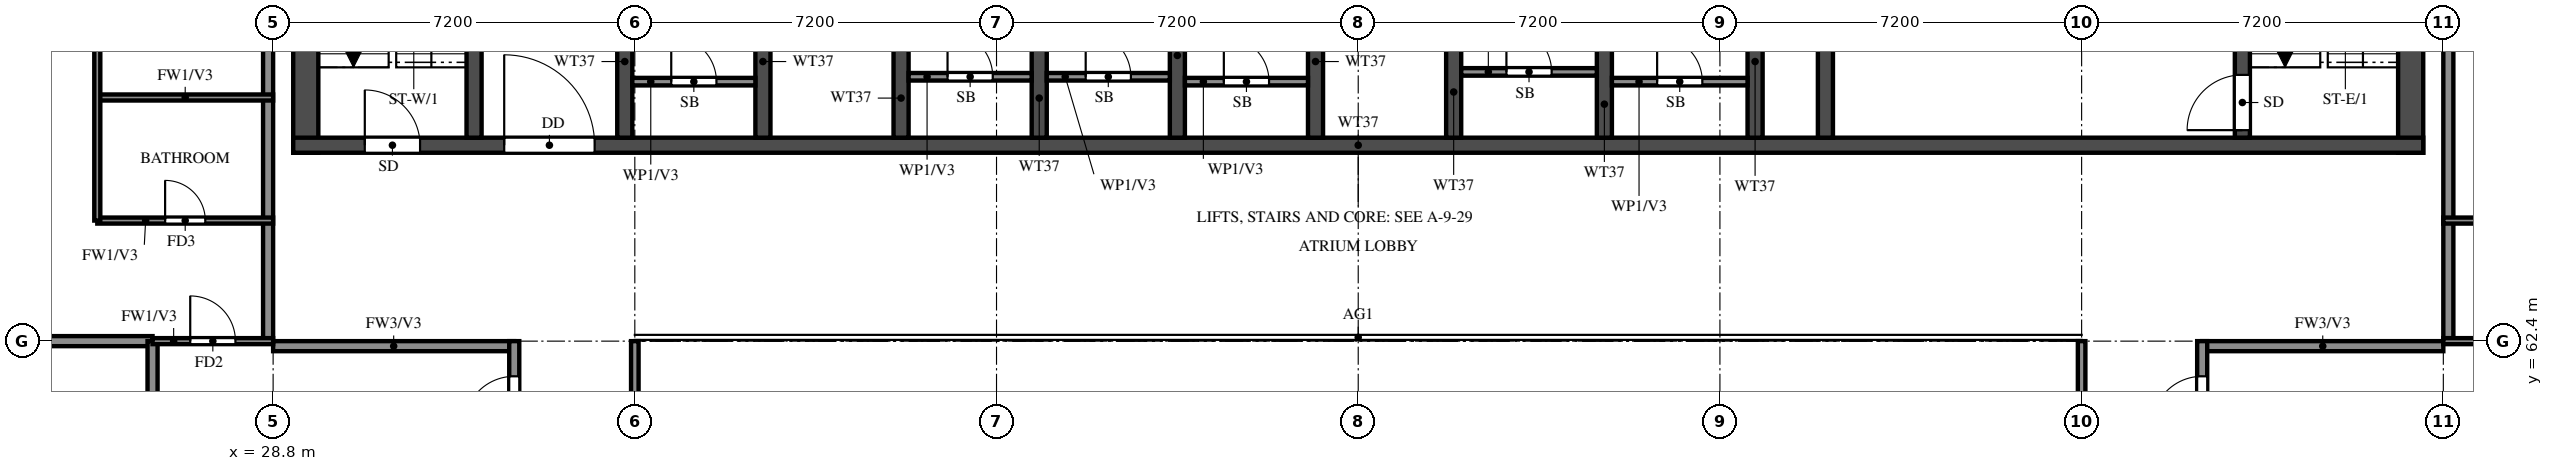
"""IFC4 building model, lengths in metres.
Left out: names, types, materials, properties, quantities, classifications, styles, units other than length and angle.
Written with IfcOpenShell. Run it as: python <this file> out.ifc"""

import sys

from ifc_helpers import new_model, si_unit, direction, frame, frame_2d, origin, place, context, subcontext, project, spatial, rectangle, extrude, element, fill, save


model = new_model("IFC4")
c1 = context("Model", 3, precision=1e-05, world=origin(), true_north=direction((0.0, 1.0)))
c2 = subcontext(c1, "Body", "Model", "MODEL_VIEW")
j1 = project(units=[si_unit("LENGTHUNIT", "METRE"), si_unit("PLANEANGLEUNIT", "RADIAN")], contexts=[c1])
p1 = place(None, origin())
s1 = spatial("IfcSite", under=j1, at=p1, CompositionType="ELEMENT")
p2 = place(p1, origin())
s2 = spatial("IfcBuilding", under=s1, at=p2, CompositionType="ELEMENT")
p3 = place(p2, frame((0.0, 0.0, 229.0)))
s3 = spatial("IfcBuildingStorey", under=s2, at=p3, CompositionType="ELEMENT", Elevation=229.0)
for number, where, z_axis, x_axis in (
    (1, (29.45, 66.15, 0.0), (0.0, 0.0, 1.0), (0.0, 1.0, 0.0)),
    (2, (71.35, 66.15, 0.0), (0.0, 0.0, 1.0), (0.0, 1.0, 0.0)),
):
    element("IfcWall", number, at=place(p3, frame(where, z_axis=z_axis, x_axis=x_axis)), inside=s3, PredefinedType="SHEAR", context=c2, shape_type="SweptSolid", body=[
        extrude(rectangle(XDim=11.85, YDim=0.5, at=frame_2d((5.925, 0.0))), origin(), (0.0, 0.0, 1.0), 3.22),
    ])
p4 = place(p3, frame((29.2, 66.3, 0.0), z_axis=(0.0, 0.0, 1.0), x_axis=(1.0, 0.0, 0.0)))
e3 = element("IfcWall", 3, at=p4, inside=s3, PredefinedType="SHEAR", context=c2, shape_type="SweptSolid", body=[
    extrude(rectangle(XDim=42.4, YDim=0.3, at=frame_2d((21.2, 0.0))), origin(), (0.0, 0.0, 1.0), 3.22),
])
p5 = place(p4, frame((1.425, 0.0, 0.0)))
e4 = element("IfcOpeningElement", 4, at=p5, cuts=e3, PredefinedType="OPENING", context=c2, shape_type="SweptSolid", body=[
    extrude(rectangle(XDim=1.1, YDim=2.1, at=frame_2d((0.55, 1.05))), frame((0.0, 0.16, 0.0), z_axis=(0.0, -1.0, 0.0), x_axis=(1.0, 0.0, 0.0)), (0.0, 0.0, 1.0), 0.32),
])
p6 = place(p4, frame((4.2, 0.0, 0.0)))
e5 = element("IfcOpeningElement", 5, at=p6, cuts=e3, PredefinedType="OPENING", context=c2, shape_type="SweptSolid", body=[
    extrude(rectangle(XDim=1.8, YDim=2.1, at=frame_2d((0.9, 1.05))), frame((0.0, 0.16, 0.0), z_axis=(0.0, -1.0, 0.0), x_axis=(1.0, 0.0, 0.0)), (0.0, 0.0, 1.0), 0.32),
])
p7 = place(p3, frame((32.8, 66.45, 0.0), z_axis=(0.0, 0.0, 1.0), x_axis=(0.0, 1.0, 0.0)))
e6 = element("IfcWall", 6, at=p7, inside=s3, PredefinedType="SHEAR", context=c2, shape_type="SweptSolid", body=[
    extrude(rectangle(XDim=11.05, YDim=0.3, at=frame_2d((5.525, 0.0))), origin(), (0.0, 0.0, 1.0), 3.22),
])
p8 = place(p3, frame((68.0, 66.45, 0.0), z_axis=(0.0, 0.0, 1.0), x_axis=(0.0, 1.0, 0.0)))
e7 = element("IfcWall", 7, at=p8, inside=s3, PredefinedType="SHEAR", context=c2, shape_type="SweptSolid", body=[
    extrude(rectangle(XDim=11.05, YDim=0.3, at=frame_2d((5.525, 0.0))), origin(), (0.0, 0.0, 1.0), 3.22),
])
p9 = place(p8, frame((0.15, 0.0, 0.0)))
e8 = element("IfcOpeningElement", 8, at=p9, cuts=e7, PredefinedType="OPENING", context=c2, shape_type="SweptSolid", body=[
    extrude(rectangle(XDim=1.1, YDim=2.1, at=frame_2d((0.55, 1.05))), frame((0.0, 0.16, 0.0), z_axis=(0.0, -1.0, 0.0), x_axis=(1.0, 0.0, 0.0)), (0.0, 0.0, 1.0), 0.32),
])
p10 = place(p3, frame((59.7, 66.45, 0.0), z_axis=(0.0, 0.0, 1.0), x_axis=(0.0, 1.0, 0.0)))
e9 = element("IfcWall", 9, at=p10, inside=s3, PredefinedType="SHEAR", context=c2, shape_type="SweptSolid", body=[
    extrude(rectangle(XDim=6.175, YDim=0.3, at=frame_2d((3.087, 0.0))), origin(), (0.0, 0.0, 1.0), 3.22),
])
p11 = place(p10, frame((3.85, 0.0, 0.0)))
e10 = element("IfcOpeningElement", 10, at=p11, cuts=e9, PredefinedType="OPENING", context=c2, shape_type="SweptSolid", body=[
    extrude(rectangle(XDim=1.2, YDim=2.1, at=frame_2d((0.6, 1.05))), frame((0.0, 0.16, 0.0), z_axis=(0.0, -1.0, 0.0), x_axis=(1.0, 0.0, 0.0)), (0.0, 0.0, 1.0), 0.32),
])
for number, where, z_axis, x_axis in (
    (11, (35.8, 66.45, 0.0), (0.0, 0.0, 1.0), (0.0, 1.0, 0.0)),
    (12, (38.55, 66.45, 0.0), (0.0, 0.0, 1.0), (0.0, 1.0, 0.0)),
    (13, (41.3, 66.45, 0.0), (0.0, 0.0, 1.0), (0.0, 1.0, 0.0)),
    (14, (44.05, 66.45, 0.0), (0.0, 0.0, 1.0), (0.0, 1.0, 0.0)),
    (15, (46.8, 66.45, 0.0), (0.0, 0.0, 1.0), (0.0, 1.0, 0.0)),
    (16, (49.55, 66.45, 0.0), (0.0, 0.0, 1.0), (0.0, 1.0, 0.0)),
    (17, (52.3, 66.45, 0.0), (0.0, 0.0, 1.0), (0.0, 1.0, 0.0)),
    (18, (55.3, 66.45, 0.0), (0.0, 0.0, 1.0), (0.0, 1.0, 0.0)),
    (19, (58.3, 66.45, 0.0), (0.0, 0.0, 1.0), (0.0, 1.0, 0.0)),
):
    element("IfcWall", number, at=place(p3, frame(where, z_axis=z_axis, x_axis=x_axis)), inside=s3, PredefinedType="SHEAR", context=c2, shape_type="SweptSolid", body=[
        extrude(rectangle(XDim=2.425, YDim=0.3, at=frame_2d((1.212, 0.0))), origin(), (0.0, 0.0, 1.0), 3.22),
    ])
p12 = place(p3, frame((35.95, 67.565, 0.0), z_axis=(0.0, 0.0, 1.0), x_axis=(1.0, 0.0, 0.0)))
e20 = element("IfcWall", 20, at=p12, inside=s3, PredefinedType="PARTITIONING", context=c2, shape_type="SweptSolid", body=[
    extrude(rectangle(XDim=2.45, YDim=0.15, at=frame_2d((1.225, 0.0))), origin(), (0.0, 0.0, 1.0), 3.22),
])
p13 = place(p12, frame((0.775, 0.0, 0.0)))
e21 = element("IfcOpeningElement", 21, at=p13, cuts=e20, PredefinedType="OPENING", context=c2, shape_type="SweptSolid", body=[
    extrude(rectangle(XDim=0.9, YDim=2.1, at=frame_2d((0.45, 1.05))), frame((0.0, 0.085, 0.0), z_axis=(0.0, -1.0, 0.0), x_axis=(1.0, 0.0, 0.0)), (0.0, 0.0, 1.0), 0.17),
])
p14 = place(p3, frame((41.45, 67.663, 0.0), z_axis=(0.0, 0.0, 1.0), x_axis=(1.0, 0.0, 0.0)))
e22 = element("IfcWall", 22, at=p14, inside=s3, PredefinedType="PARTITIONING", context=c2, shape_type="SweptSolid", body=[
    extrude(rectangle(XDim=2.45, YDim=0.15, at=frame_2d((1.225, 0.0))), origin(), (0.0, 0.0, 1.0), 3.22),
])
p15 = place(p14, frame((0.775, 0.0, 0.0)))
e23 = element("IfcOpeningElement", 23, at=p15, cuts=e22, PredefinedType="OPENING", context=c2, shape_type="SweptSolid", body=[
    extrude(rectangle(XDim=0.9, YDim=2.1, at=frame_2d((0.45, 1.05))), frame((0.0, 0.085, 0.0), z_axis=(0.0, -1.0, 0.0), x_axis=(1.0, 0.0, 0.0)), (0.0, 0.0, 1.0), 0.17),
])
p16 = place(p3, frame((44.2, 67.663, 0.0), z_axis=(0.0, 0.0, 1.0), x_axis=(1.0, 0.0, 0.0)))
e24 = element("IfcWall", 24, at=p16, inside=s3, PredefinedType="PARTITIONING", context=c2, shape_type="SweptSolid", body=[
    extrude(rectangle(XDim=2.45, YDim=0.15, at=frame_2d((1.225, 0.0))), origin(), (0.0, 0.0, 1.0), 3.22),
])
p17 = place(p16, frame((0.775, 0.0, 0.0)))
e25 = element("IfcOpeningElement", 25, at=p17, cuts=e24, PredefinedType="OPENING", context=c2, shape_type="SweptSolid", body=[
    extrude(rectangle(XDim=0.9, YDim=2.1, at=frame_2d((0.45, 1.05))), frame((0.0, 0.085, 0.0), z_axis=(0.0, -1.0, 0.0), x_axis=(1.0, 0.0, 0.0)), (0.0, 0.0, 1.0), 0.17),
])
p18 = place(p3, frame((46.95, 67.565, 0.0), z_axis=(0.0, 0.0, 1.0), x_axis=(1.0, 0.0, 0.0)))
e26 = element("IfcWall", 26, at=p18, inside=s3, PredefinedType="PARTITIONING", context=c2, shape_type="SweptSolid", body=[
    extrude(rectangle(XDim=2.45, YDim=0.15, at=frame_2d((1.225, 0.0))), origin(), (0.0, 0.0, 1.0), 3.22),
])
p19 = place(p18, frame((0.775, 0.0, 0.0)))
e27 = element("IfcOpeningElement", 27, at=p19, cuts=e26, PredefinedType="OPENING", context=c2, shape_type="SweptSolid", body=[
    extrude(rectangle(XDim=0.9, YDim=2.1, at=frame_2d((0.45, 1.05))), frame((0.0, 0.085, 0.0), z_axis=(0.0, -1.0, 0.0), x_axis=(1.0, 0.0, 0.0)), (0.0, 0.0, 1.0), 0.17),
])
p20 = place(p3, frame((52.45, 67.76, 0.0), z_axis=(0.0, 0.0, 1.0), x_axis=(1.0, 0.0, 0.0)))
e28 = element("IfcWall", 28, at=p20, inside=s3, PredefinedType="PARTITIONING", context=c2, shape_type="SweptSolid", body=[
    extrude(rectangle(XDim=2.7, YDim=0.15, at=frame_2d((1.35, 0.0))), origin(), (0.0, 0.0, 1.0), 3.22),
])
p21 = place(p20, frame((0.9, 0.0, 0.0)))
e29 = element("IfcOpeningElement", 29, at=p21, cuts=e28, PredefinedType="OPENING", context=c2, shape_type="SweptSolid", body=[
    extrude(rectangle(XDim=0.9, YDim=2.1, at=frame_2d((0.45, 1.05))), frame((0.0, 0.085, 0.0), z_axis=(0.0, -1.0, 0.0), x_axis=(1.0, 0.0, 0.0)), (0.0, 0.0, 1.0), 0.17),
])
p22 = place(p3, frame((55.45, 67.565, 0.0), z_axis=(0.0, 0.0, 1.0), x_axis=(1.0, 0.0, 0.0)))
e30 = element("IfcWall", 30, at=p22, inside=s3, PredefinedType="PARTITIONING", context=c2, shape_type="SweptSolid", body=[
    extrude(rectangle(XDim=2.7, YDim=0.15, at=frame_2d((1.35, 0.0))), origin(), (0.0, 0.0, 1.0), 3.22),
])
p23 = place(p22, frame((0.9, 0.0, 0.0)))
e31 = element("IfcOpeningElement", 31, at=p23, cuts=e30, PredefinedType="OPENING", context=c2, shape_type="SweptSolid", body=[
    extrude(rectangle(XDim=0.9, YDim=2.1, at=frame_2d((0.45, 1.05))), frame((0.0, 0.085, 0.0), z_axis=(0.0, -1.0, 0.0), x_axis=(1.0, 0.0, 0.0)), (0.0, 0.0, 1.0), 0.17),
])
for number, where, z_axis, x_axis in (
    (32, (28.8, 62.3, 0.0), (0.0, 0.0, 1.0), (1.0, 0.0, 0.0)),
    (33, (67.2, 62.3, 0.0), (0.0, 0.0, 1.0), (1.0, 0.0, 0.0)),
):
    element("IfcWall", number, at=place(p3, frame(where, z_axis=z_axis, x_axis=x_axis)), inside=s3, PredefinedType="SOLIDWALL", context=c2, shape_type="SweptSolid", body=[
        extrude(rectangle(XDim=4.8, YDim=0.2, at=frame_2d((2.4, 0.0))), origin(), (0.0, 0.0, 1.0), 3.22),
    ])
p24 = place(p3, frame((28.7, 62.4, 0.0), z_axis=(0.0, 0.0, 1.0), x_axis=(0.0, 1.0, 0.0)))
e34 = element("IfcWall", 34, at=p24, inside=s3, PredefinedType="SOLIDWALL", context=c2, shape_type="SweptSolid", body=[
    extrude(rectangle(XDim=15.6, YDim=0.2, at=frame_2d((7.8, 0.0))), origin(), (0.0, 0.0, 1.0), 3.22),
])
p25 = place(p3, frame((33.6, 60.0, 0.0), z_axis=(0.0, 0.0, 1.0), x_axis=(0.0, 1.0, 0.0)))
e35 = element("IfcWall", 35, at=p25, inside=s3, PredefinedType="SOLIDWALL", context=c2, shape_type="SweptSolid", body=[
    extrude(rectangle(XDim=2.4, YDim=0.2, at=frame_2d((1.2, 0.0))), origin(), (0.0, 0.0, 1.0), 3.22),
])
p26 = place(p25, frame((0.7, 0.0, 0.0)))
e36 = element("IfcOpeningElement", 36, at=p26, cuts=e35, PredefinedType="OPENING", context=c2, shape_type="SweptSolid", body=[
    extrude(rectangle(XDim=1.0, YDim=2.1, at=frame_2d((0.5, 1.05))), frame((0.0, 0.11, 0.0), z_axis=(0.0, -1.0, 0.0), x_axis=(1.0, 0.0, 0.0)), (0.0, 0.0, 1.0), 0.22),
])
p27 = place(p3, frame((67.2, 60.0, 0.0), z_axis=(0.0, 0.0, 1.0), x_axis=(0.0, 1.0, 0.0)))
e37 = element("IfcWall", 37, at=p27, inside=s3, PredefinedType="SOLIDWALL", context=c2, shape_type="SweptSolid", body=[
    extrude(rectangle(XDim=2.4, YDim=0.2, at=frame_2d((1.2, 0.0))), origin(), (0.0, 0.0, 1.0), 3.22),
])
p28 = place(p27, frame((0.7, 0.0, 0.0)))
e38 = element("IfcOpeningElement", 38, at=p28, cuts=e37, PredefinedType="OPENING", context=c2, shape_type="SweptSolid", body=[
    extrude(rectangle(XDim=1.0, YDim=2.1, at=frame_2d((0.5, 1.05))), frame((0.0, 0.11, 0.0), z_axis=(0.0, -1.0, 0.0), x_axis=(1.0, 0.0, 0.0)), (0.0, 0.0, 1.0), 0.22),
])
p29 = place(p3, frame((72.1, 62.4, 0.0), z_axis=(0.0, 0.0, 1.0), x_axis=(0.0, 1.0, 0.0)))
e39 = element("IfcWall", 39, at=p29, inside=s3, PredefinedType="SOLIDWALL", context=c2, shape_type="SweptSolid", body=[
    extrude(rectangle(XDim=15.6, YDim=0.2, at=frame_2d((7.8, 0.0))), origin(), (0.0, 0.0, 1.0), 3.22),
])
p30 = place(p3, frame((18.525, 62.4, 0.0), z_axis=(0.0, 0.0, 1.0), x_axis=(1.0, 0.0, 0.0)))
e40 = element("IfcWall", 40, at=p30, inside=s3, PredefinedType="SOLIDWALL", context=c2, shape_type="SweptSolid", body=[
    extrude(rectangle(XDim=7.875, YDim=0.2, at=frame_2d((3.938, 0.0))), origin(), (0.0, 0.0, 1.0), 3.22),
])
p31 = place(p3, frame((26.4, 60.0, 0.0), z_axis=(0.0, 0.0, 1.0), x_axis=(0.0, 1.0, 0.0)))
e41 = element("IfcWall", 41, at=p31, inside=s3, PredefinedType="SOLIDWALL", context=c2, shape_type="SweptSolid", body=[
    extrude(rectangle(XDim=2.4, YDim=0.2, at=frame_2d((1.2, 0.0))), origin(), (0.0, 0.0, 1.0), 3.22),
])
p32 = place(p3, frame((26.4, 62.4, 0.0), z_axis=(0.0, 0.0, 1.0), x_axis=(1.0, 0.0, 0.0)))
e42 = element("IfcWall", 42, at=p32, inside=s3, PredefinedType="PARTITIONING", context=c2, shape_type="SweptSolid", body=[
    extrude(rectangle(XDim=2.4, YDim=0.12, at=frame_2d((1.2, 0.0))), origin(), (0.0, 0.0, 1.0), 3.22),
])
p33 = place(p32, frame((0.75, 0.0, 0.0)))
e43 = element("IfcOpeningElement", 43, at=p33, cuts=e42, PredefinedType="OPENING", context=c2, shape_type="SweptSolid", body=[
    extrude(rectangle(XDim=0.9, YDim=2.1, at=frame_2d((0.45, 1.05))), frame((0.0, 0.07, 0.0), z_axis=(0.0, -1.0, 0.0), x_axis=(1.0, 0.0, 0.0)), (0.0, 0.0, 1.0), 0.14),
])
p34 = place(p3, frame((72.0, 62.4, 0.0), z_axis=(0.0, 0.0, 1.0), x_axis=(1.0, 0.0, 0.0)))
e44 = element("IfcWall", 44, at=p34, inside=s3, PredefinedType="PARTITIONING", context=c2, shape_type="SweptSolid", body=[
    extrude(rectangle(XDim=2.4, YDim=0.12, at=frame_2d((1.2, 0.0))), origin(), (0.0, 0.0, 1.0), 3.22),
])
p35 = place(p34, frame((0.75, 0.0, 0.0)))
e45 = element("IfcOpeningElement", 45, at=p35, cuts=e44, PredefinedType="OPENING", context=c2, shape_type="SweptSolid", body=[
    extrude(rectangle(XDim=0.9, YDim=2.1, at=frame_2d((0.45, 1.05))), frame((0.0, 0.07, 0.0), z_axis=(0.0, -1.0, 0.0), x_axis=(1.0, 0.0, 0.0)), (0.0, 0.0, 1.0), 0.14),
])
p36 = place(p3, frame((25.3, 64.8, 0.0), z_axis=(0.0, 0.0, 1.0), x_axis=(1.0, 0.0, 0.0)))
e46 = element("IfcWall", 46, at=p36, inside=s3, PredefinedType="PARTITIONING", context=c2, shape_type="SweptSolid", body=[
    extrude(rectangle(XDim=3.5, YDim=0.12, at=frame_2d((1.75, 0.0))), origin(), (0.0, 0.0, 1.0), 3.22),
])
p37 = place(p36, frame((1.35, 0.0, 0.0)))
e47 = element("IfcOpeningElement", 47, at=p37, cuts=e46, PredefinedType="OPENING", context=c2, shape_type="SweptSolid", body=[
    extrude(rectangle(XDim=0.8, YDim=2.1, at=frame_2d((0.4, 1.05))), frame((0.0, 0.07, 0.0), z_axis=(0.0, -1.0, 0.0), x_axis=(1.0, 0.0, 0.0)), (0.0, 0.0, 1.0), 0.14),
])
for number, where, z_axis, x_axis in (
    (48, (72.0, 64.8, 0.0), (0.0, 0.0, 1.0), (1.0, 0.0, 0.0)),
    (49, (25.3, 67.25, 0.0), (0.0, 0.0, 1.0), (1.0, 0.0, 0.0)),
):
    element("IfcWall", number, at=place(p3, frame(where, z_axis=z_axis, x_axis=x_axis)), inside=s3, PredefinedType="PARTITIONING", context=c2, shape_type="SweptSolid", body=[
        extrude(rectangle(XDim=3.5, YDim=0.12, at=frame_2d((1.75, 0.0))), origin(), (0.0, 0.0, 1.0), 3.22),
    ])
p38 = place(p3, frame((25.3, 64.8, 0.0), z_axis=(0.0, 0.0, 1.0), x_axis=(0.0, 1.0, 0.0)))
e50 = element("IfcWall", 50, at=p38, inside=s3, PredefinedType="PARTITIONING", context=c2, shape_type="SweptSolid", body=[
    extrude(rectangle(XDim=8.4, YDim=0.12, at=frame_2d((4.2, 0.0))), origin(), (0.0, 0.0, 1.0), 3.22),
])
p39 = place(p38, frame((4.975, 0.0, 0.0)))
e51 = element("IfcOpeningElement", 51, at=p39, cuts=e50, PredefinedType="OPENING", context=c2, shape_type="SweptSolid", body=[
    extrude(rectangle(XDim=0.9, YDim=2.1, at=frame_2d((0.45, 1.05))), frame((0.0, 0.07, 0.0), z_axis=(0.0, -1.0, 0.0), x_axis=(1.0, 0.0, 0.0)), (0.0, 0.0, 1.0), 0.14),
])
for number, where, z_axis, x_axis in (
    (52, (36.0, 48.0, 0.0), (0.0, 0.0, 1.0), (0.0, 1.0, 0.0)),
    (53, (64.8, 48.0, 0.0), (0.0, 0.0, 1.0), (0.0, 1.0, 0.0)),
):
    element("IfcWall", number, at=place(p3, frame(where, z_axis=z_axis, x_axis=x_axis)), inside=s3, PredefinedType="SOLIDWALL", context=c2, shape_type="SweptSolid", body=[
        extrude(rectangle(XDim=14.4, YDim=0.15, at=frame_2d((7.2, 0.0))), origin(), (0.0, 0.0, 1.0), 2.32),
    ])
p40 = place(p5, origin())
e54 = element("IfcDoor", 54, at=p40, inside=s3, OperationType="SINGLE_SWING_LEFT", PredefinedType="DOOR", context=c2, shape_type="SweptSolid", body=[
    extrude(rectangle(XDim=1.1, YDim=2.1, at=frame_2d((0.55, 1.05))), frame((0.0, 0.025, 0.0), z_axis=(0.0, -1.0, 0.0), x_axis=(1.0, 0.0, 0.0)), (0.0, 0.0, 1.0), 0.05),
])
fill(e4, e54)
p41 = place(p9, origin())
e55 = element("IfcDoor", 55, at=p41, inside=s3, OperationType="SINGLE_SWING_RIGHT", PredefinedType="DOOR", context=c2, shape_type="SweptSolid", body=[
    extrude(rectangle(XDim=1.1, YDim=2.1, at=frame_2d((0.55, 1.05))), frame((0.0, 0.025, 0.0), z_axis=(0.0, -1.0, 0.0), x_axis=(1.0, 0.0, 0.0)), (0.0, 0.0, 1.0), 0.05),
])
fill(e8, e55)
p42 = place(p6, origin())
e56 = element("IfcDoor", 56, at=p42, inside=s3, OperationType="DOUBLE_DOOR_SINGLE_SWING", PredefinedType="DOOR", context=c2, shape_type="SweptSolid", body=[
    extrude(rectangle(XDim=1.8, YDim=2.1, at=frame_2d((0.9, 1.05))), frame((0.0, 0.025, 0.0), z_axis=(0.0, -1.0, 0.0), x_axis=(1.0, 0.0, 0.0)), (0.0, 0.0, 1.0), 0.05),
])
fill(e5, e56)
p43 = place(p13, origin())
e57 = element("IfcDoor", 57, at=p43, inside=s3, OperationType="SINGLE_SWING_RIGHT", PredefinedType="DOOR", context=c2, shape_type="SweptSolid", body=[
    extrude(rectangle(XDim=0.9, YDim=2.1, at=frame_2d((0.45, 1.05))), frame((0.0, 0.025, 0.0), z_axis=(0.0, -1.0, 0.0), x_axis=(1.0, 0.0, 0.0)), (0.0, 0.0, 1.0), 0.05),
])
fill(e21, e57)
p44 = place(p15, origin())
e58 = element("IfcDoor", 58, at=p44, inside=s3, OperationType="SINGLE_SWING_RIGHT", PredefinedType="DOOR", context=c2, shape_type="SweptSolid", body=[
    extrude(rectangle(XDim=0.9, YDim=2.1, at=frame_2d((0.45, 1.05))), frame((0.0, 0.025, 0.0), z_axis=(0.0, -1.0, 0.0), x_axis=(1.0, 0.0, 0.0)), (0.0, 0.0, 1.0), 0.05),
])
fill(e23, e58)
p45 = place(p17, origin())
e59 = element("IfcDoor", 59, at=p45, inside=s3, OperationType="SINGLE_SWING_LEFT", PredefinedType="DOOR", context=c2, shape_type="SweptSolid", body=[
    extrude(rectangle(XDim=0.9, YDim=2.1, at=frame_2d((0.45, 1.05))), frame((0.0, 0.025, 0.0), z_axis=(0.0, -1.0, 0.0), x_axis=(1.0, 0.0, 0.0)), (0.0, 0.0, 1.0), 0.05),
])
fill(e25, e59)
p46 = place(p19, origin())
e60 = element("IfcDoor", 60, at=p46, inside=s3, OperationType="SINGLE_SWING_RIGHT", PredefinedType="DOOR", context=c2, shape_type="SweptSolid", body=[
    extrude(rectangle(XDim=0.9, YDim=2.1, at=frame_2d((0.45, 1.05))), frame((0.0, 0.025, 0.0), z_axis=(0.0, -1.0, 0.0), x_axis=(1.0, 0.0, 0.0)), (0.0, 0.0, 1.0), 0.05),
])
fill(e27, e60)
p47 = place(p21, origin())
e61 = element("IfcDoor", 61, at=p47, inside=s3, OperationType="SINGLE_SWING_LEFT", PredefinedType="DOOR", context=c2, shape_type="SweptSolid", body=[
    extrude(rectangle(XDim=0.9, YDim=2.1, at=frame_2d((0.45, 1.05))), frame((0.0, 0.025, 0.0), z_axis=(0.0, -1.0, 0.0), x_axis=(1.0, 0.0, 0.0)), (0.0, 0.0, 1.0), 0.05),
])
fill(e29, e61)
p48 = place(p23, origin())
e62 = element("IfcDoor", 62, at=p48, inside=s3, OperationType="SINGLE_SWING_RIGHT", PredefinedType="DOOR", context=c2, shape_type="SweptSolid", body=[
    extrude(rectangle(XDim=0.9, YDim=2.1, at=frame_2d((0.45, 1.05))), frame((0.0, 0.025, 0.0), z_axis=(0.0, -1.0, 0.0), x_axis=(1.0, 0.0, 0.0)), (0.0, 0.0, 1.0), 0.05),
])
fill(e31, e62)
p49 = place(p33, origin())
e63 = element("IfcDoor", 63, at=p49, inside=s3, OperationType="SINGLE_SWING_RIGHT", PredefinedType="DOOR", context=c2, shape_type="SweptSolid", body=[
    extrude(rectangle(XDim=0.9, YDim=2.1, at=frame_2d((0.45, 1.05))), frame((0.0, 0.025, 0.0), z_axis=(0.0, -1.0, 0.0), x_axis=(1.0, 0.0, 0.0)), (0.0, 0.0, 1.0), 0.05),
])
fill(e43, e63)
p50 = place(p26, origin())
e64 = element("IfcDoor", 64, at=p50, inside=s3, OperationType="SINGLE_SWING_LEFT", PredefinedType="DOOR", context=c2, shape_type="SweptSolid", body=[
    extrude(rectangle(XDim=1.0, YDim=2.1, at=frame_2d((0.5, 1.05))), frame((0.0, 0.025, 0.0), z_axis=(0.0, -1.0, 0.0), x_axis=(1.0, 0.0, 0.0)), (0.0, 0.0, 1.0), 0.05),
])
fill(e36, e64)
p51 = place(p37, origin())
e65 = element("IfcDoor", 65, at=p51, inside=s3, OperationType="SINGLE_SWING_RIGHT", PredefinedType="DOOR", context=c2, shape_type="SweptSolid", body=[
    extrude(rectangle(XDim=0.8, YDim=2.1, at=frame_2d((0.4, 1.05))), frame((0.0, 0.025, 0.0), z_axis=(0.0, -1.0, 0.0), x_axis=(1.0, 0.0, 0.0)), (0.0, 0.0, 1.0), 0.05),
])
fill(e47, e65)
p52 = place(p28, origin())
e66 = element("IfcDoor", 66, at=p52, inside=s3, OperationType="SINGLE_SWING_RIGHT", PredefinedType="DOOR", context=c2, shape_type="SweptSolid", body=[
    extrude(rectangle(XDim=1.0, YDim=2.1, at=frame_2d((0.5, 1.05))), frame((0.0, 0.025, 0.0), z_axis=(0.0, -1.0, 0.0), x_axis=(1.0, 0.0, 0.0)), (0.0, 0.0, 1.0), 0.05),
])
fill(e38, e66)
save(model, sys.argv[1])
